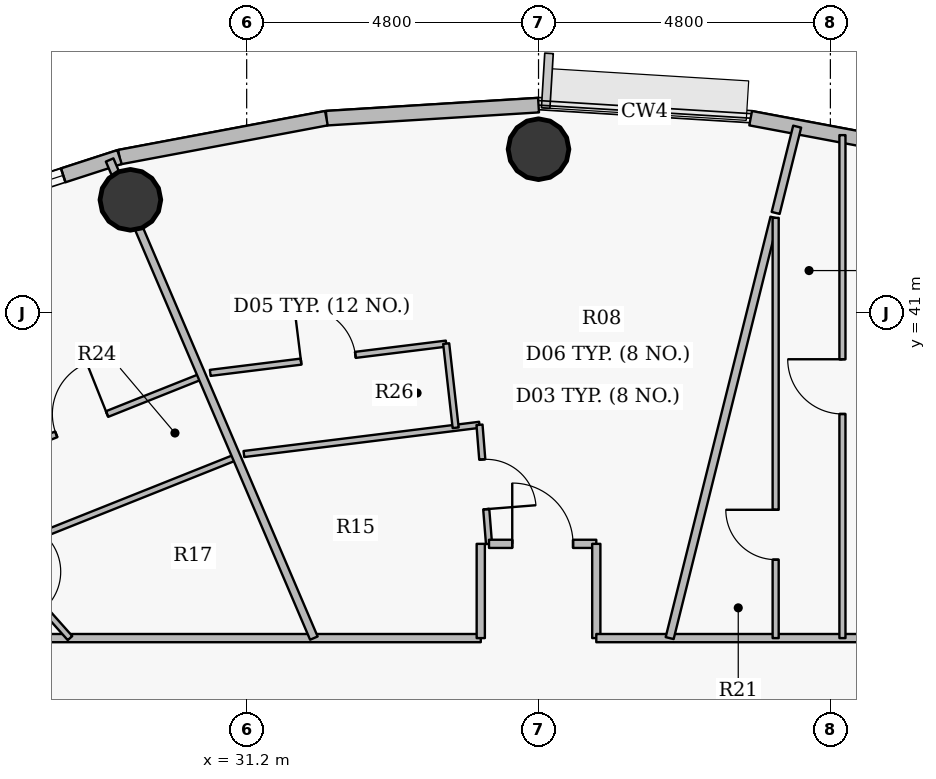
"""IFC4 building model, lengths in metres.
Left out: names, types, materials, properties, quantities, classifications, styles, units other than length and angle.
Written with IfcOpenShell. Run it as: python <this file> out.ifc"""

import sys

from ifc_helpers import new_model, si_unit, direction, frame, frame_2d, origin, origin_2d, place, context, subcontext, project, spatial, rectangle, hollow_circle, extrude, source, transform, mapped, element, fill, save


model = new_model("IFC4")
c1 = context("Model", 3, precision=1e-05, world=origin(), true_north=direction((0.0, 1.0)))
c2 = subcontext(c1, "Body", "Model", "MODEL_VIEW")
j1 = project(units=[si_unit("LENGTHUNIT", "METRE"), si_unit("PLANEANGLEUNIT", "RADIAN")], contexts=[c1])
p1 = place(None, origin())
s1 = spatial("IfcSite", under=j1, at=p1, CompositionType="ELEMENT")
p2 = place(p1, origin())
s2 = spatial("IfcBuilding", under=s1, at=p2, CompositionType="ELEMENT")
p3 = place(p2, frame((0.0, 0.0, 295.5)))
s3 = spatial("IfcBuildingStorey", under=s2, at=p3, CompositionType="ELEMENT", Elevation=295.5)
for number, where, z_axis, x_axis in (
    (1, (36.0, 43.69, 0.0), (0.0, 0.0, 1.0), (1.0, 0.0, 0.0)),
    (2, (29.288, 42.858, 0.0), (0.0, 0.0, 1.0), (1.0, 0.0, 0.0)),
):
    element("IfcColumn", number, at=place(p3, frame(where, z_axis=z_axis, x_axis=x_axis)), inside=s3, PredefinedType="COLUMN", context=c2, shape_type="SweptSolid", body=[
        extrude(hollow_circle(Radius=0.5, WallThickness=0.032, at=origin_2d()), origin(), (0.0, 0.0, 1.0), 3.75),
    ])
p4 = place(p3, frame((39.489, 44.2, 0.0), z_axis=(0.0, 0.0, 1.0), x_axis=(0.982782655757, -0.184765395959, 0.0)))
e3 = element("IfcWall", 3, at=p4, inside=s3, PredefinedType="SOLIDWALL", context=c2, shape_type="SweptSolid", body=[
    extrude(rectangle(XDim=3.462, YDim=0.24, at=frame_2d((1.731, 0.0))), origin(), (0.0, 0.0, 1.0), 3.5),
])
p5 = place(p3, frame((32.511, 44.2, 0.0), z_axis=(0.0, 0.0, 1.0), x_axis=(0.998104946479, 0.061534671648, 0.0)))
e4 = element("IfcWall", 4, at=p5, inside=s3, PredefinedType="SOLIDWALL", context=c2, shape_type="SweptSolid", body=[
    extrude(rectangle(XDim=3.495, YDim=0.24, at=frame_2d((1.748, 0.0))), origin(), (0.0, 0.0, 1.0), 3.5),
])
p6 = place(p3, frame((29.109, 43.56, 0.0), z_axis=(0.0, 0.0, 1.0), x_axis=(0.982782655757, 0.184765395959, 0.0)))
e5 = element("IfcWall", 5, at=p6, inside=s3, PredefinedType="SOLIDWALL", context=c2, shape_type="SweptSolid", body=[
    extrude(rectangle(XDim=3.462, YDim=0.24, at=frame_2d((1.731, 0.0))), origin(), (0.0, 0.0, 1.0), 3.5),
])
p7 = place(p3, frame((25.877, 42.512, 0.0), z_axis=(0.0, 0.0, 1.0), x_axis=(0.95123136723, 0.308478339592, 0.0)))
e6 = element("IfcWall", 6, at=p7, inside=s3, PredefinedType="SOLIDWALL", context=c2, shape_type="SweptSolid", body=[
    extrude(rectangle(XDim=3.398, YDim=0.24, at=frame_2d((1.699, 0.0))), origin(), (0.0, 0.0, 1.0), 3.5),
])
p8 = place(p7, frame((0.824, 0.0, 0.9)))
e7 = element("IfcOpeningElement", 7, at=p8, cuts=e6, PredefinedType="OPENING", context=c2, shape_type="SweptSolid", body=[
    extrude(rectangle(XDim=1.6, YDim=1.75, at=origin_2d()), frame((0.8, 0.13, 0.875), z_axis=(0.0, -1.0, 0.0), x_axis=(1.0, 0.0, 0.0)), (0.0, 0.0, 1.0), 0.26),
])
p9 = place(p3, frame((24.95, 35.65, 0.0), z_axis=(0.0, 0.0, 1.0), x_axis=(1.0, 0.0, 0.0)))
e8 = element("IfcWall", 8, at=p9, inside=s3, PredefinedType="PARTITIONING", context=c2, shape_type="SweptSolid", body=[
    extrude(rectangle(XDim=10.1, YDim=0.135, at=frame_2d((5.05, 0.0))), origin(), (0.0, 0.0, 1.0), 3.035),
])
p10 = place(p9, frame((1.192, 0.0, 0.0)))
e9 = element("IfcOpeningElement", 9, at=p10, cuts=e8, PredefinedType="OPENING", context=c2, shape_type="SweptSolid", body=[
    extrude(rectangle(XDim=1.0, YDim=2.15, at=origin_2d()), frame((0.5, 0.078, 1.075), z_axis=(0.0, -1.0, 0.0), x_axis=(1.0, 0.0, 0.0)), (0.0, 0.0, 1.0), 0.155),
])
p11 = place(p3, frame((26.507, 38.378, 0.0), z_axis=(0.0, 0.0, 1.0), x_axis=(0.928788495711, 0.370610213345, 0.0)))
e10 = element("IfcWall", 10, at=p11, inside=s3, PredefinedType="PARTITIONING", context=c2, shape_type="SweptSolid", body=[
    extrude(rectangle(XDim=4.261, YDim=0.1, at=frame_2d((2.131, 0.0))), origin(), (0.0, 0.0, 1.0), 3.035),
])
p12 = place(p11, frame((1.681, 0.0, 0.0)))
e11 = element("IfcOpeningElement", 11, at=p12, cuts=e10, PredefinedType="OPENING", context=c2, shape_type="SweptSolid", body=[
    extrude(rectangle(XDim=0.9, YDim=2.1, at=origin_2d()), frame((0.45, 0.06, 1.05), z_axis=(0.0, -1.0, 0.0), x_axis=(1.0, 0.0, 0.0)), (0.0, 0.0, 1.0), 0.12),
])
p13 = place(p3, frame((27.055, 37.042, 0.0), z_axis=(0.0, 0.0, 1.0), x_axis=(0.665119722178, -0.746736737525, 0.0)))
e12 = element("IfcWall", 12, at=p13, inside=s3, PredefinedType="PARTITIONING", context=c2, shape_type="SweptSolid", body=[
    extrude(rectangle(XDim=1.864, YDim=0.1, at=frame_2d((0.932, 0.0))), origin(), (0.0, 0.0, 1.0), 3.5),
])
p14 = place(p13, frame((0.401, 0.0, 0.0)))
e13 = element("IfcOpeningElement", 13, at=p14, cuts=e12, PredefinedType="OPENING", context=c2, shape_type="SweptSolid", body=[
    extrude(rectangle(XDim=0.82, YDim=2.1, at=origin_2d()), frame((0.41, 0.06, 1.05), z_axis=(0.0, -1.0, 0.0), x_axis=(1.0, 0.0, 0.0)), (0.0, 0.0, 1.0), 0.12),
])
p15 = place(p3, frame((27.055, 37.042, 0.0), z_axis=(0.0, 0.0, 1.0), x_axis=(0.928814416372, 0.370545246819, 0.0)))
e14 = element("IfcWall", 14, at=p15, inside=s3, PredefinedType="PARTITIONING", context=c2, shape_type="SweptSolid", body=[
    extrude(rectangle(XDim=4.283, YDim=0.1, at=frame_2d((2.141, 0.0))), origin(), (0.0, 0.0, 1.0), 3.035),
])
p16 = place(p3, frame((28.946, 43.513, 0.0), z_axis=(0.0, 0.0, 1.0), x_axis=(0.392833513872, -0.919609607594, 0.0)))
e15 = element("IfcWall", 15, at=p16, inside=s3, PredefinedType="PARTITIONING", context=c2, shape_type="SweptSolid", body=[
    extrude(rectangle(XDim=8.55, YDim=0.135, at=frame_2d((4.275, 0.0))), origin(), (0.0, 0.0, 1.0), 3.035),
])
p17 = place(p3, frame((30.601, 40.011, 0.0), z_axis=(0.0, 0.0, 1.0), x_axis=(0.992391758007, 0.123120260886, 0.0)))
e16 = element("IfcWall", 16, at=p17, inside=s3, PredefinedType="PARTITIONING", context=c2, shape_type="SweptSolid", body=[
    extrude(rectangle(XDim=3.91, YDim=0.1, at=frame_2d((1.955, 0.0))), origin(), (0.0, 0.0, 1.0), 3.035),
])
p18 = place(p17, frame((1.505, 0.0, 0.0)))
e17 = element("IfcOpeningElement", 17, at=p18, cuts=e16, PredefinedType="OPENING", context=c2, shape_type="SweptSolid", body=[
    extrude(rectangle(XDim=0.9, YDim=2.1, at=origin_2d()), frame((0.45, 0.06, 1.05), z_axis=(0.0, -1.0, 0.0), x_axis=(1.0, 0.0, 0.0)), (0.0, 0.0, 1.0), 0.12),
])
p19 = place(p3, frame((31.155, 38.677, 0.0), z_axis=(0.0, 0.0, 1.0), x_axis=(0.992398620659, 0.123064932921, 0.0)))
e18 = element("IfcWall", 18, at=p19, inside=s3, PredefinedType="PARTITIONING", context=c2, shape_type="SweptSolid", body=[
    extrude(rectangle(XDim=3.904, YDim=0.1, at=frame_2d((1.952, 0.0))), origin(), (0.0, 0.0, 1.0), 3.035),
])
p20 = place(p3, frame((34.481, 40.493, 0.0), z_axis=(0.0, 0.0, 1.0), x_axis=(0.111835884353, -0.993726690278, 0.0)))
e19 = element("IfcWall", 19, at=p20, inside=s3, PredefinedType="PARTITIONING", context=c2, shape_type="SweptSolid", body=[
    extrude(rectangle(XDim=1.393, YDim=0.1, at=frame_2d((0.696, 0.0))), origin(), (0.0, 0.0, 1.0), 3.035),
])
p21 = place(p3, frame((35.029, 39.158, 0.0), z_axis=(0.0, 0.0, 1.0), x_axis=(0.079557473452, -0.996830280649, 0.0)))
e20 = element("IfcWall", 20, at=p21, inside=s3, PredefinedType="PARTITIONING", context=c2, shape_type="SweptSolid", body=[
    extrude(rectangle(XDim=1.964, YDim=0.1, at=frame_2d((0.982, 0.0))), origin(), (0.0, 0.0, 1.0), 3.5),
])
p22 = place(p21, frame((0.572, 0.0, 0.0)))
e21 = element("IfcOpeningElement", 21, at=p22, cuts=e20, PredefinedType="OPENING", context=c2, shape_type="SweptSolid", body=[
    extrude(rectangle(XDim=0.82, YDim=2.1, at=origin_2d()), frame((0.41, 0.06, 1.05), z_axis=(0.0, -1.0, 0.0), x_axis=(1.0, 0.0, 0.0)), (0.0, 0.0, 1.0), 0.12),
])
p23 = place(p3, frame((35.05, 35.65, 0.0), z_axis=(0.0, 0.0, 1.0), x_axis=(0.0, 1.0, 0.0)))
e22 = element("IfcWall", 22, at=p23, inside=s3, PredefinedType="PARTITIONING", context=c2, shape_type="SweptSolid", body=[
    extrude(rectangle(XDim=1.55, YDim=0.135, at=frame_2d((0.775, 0.0))), origin(), (0.0, 0.0, 1.0), 3.5),
])
p24 = place(p3, frame((35.186, 37.2, 0.0), z_axis=(0.0, 0.0, 1.0), x_axis=(1.0, 0.0, 0.0)))
e23 = element("IfcWall", 23, at=p24, inside=s3, PredefinedType="PARTITIONING", context=c2, shape_type="SweptSolid", body=[
    extrude(rectangle(XDim=1.764, YDim=0.135, at=frame_2d((0.882, 0.0))), origin(), (0.0, 0.0, 1.0), 3.035),
])
p25 = place(p24, frame((0.382, 0.0, 0.0)))
e24 = element("IfcOpeningElement", 24, at=p25, cuts=e23, PredefinedType="OPENING", context=c2, shape_type="SweptSolid", body=[
    extrude(rectangle(XDim=1.0, YDim=2.15, at=origin_2d()), frame((0.5, 0.078, 1.075), z_axis=(0.0, -1.0, 0.0), x_axis=(1.0, 0.0, 0.0)), (0.0, 0.0, 1.0), 0.155),
])
p26 = place(p3, frame((36.95, 35.65, 0.0), z_axis=(0.0, 0.0, 1.0), x_axis=(0.0, 1.0, 0.0)))
e25 = element("IfcWall", 25, at=p26, inside=s3, PredefinedType="PARTITIONING", context=c2, shape_type="SweptSolid", body=[
    extrude(rectangle(XDim=1.55, YDim=0.135, at=frame_2d((0.775, 0.0))), origin(), (0.0, 0.0, 1.0), 3.5),
])
p27 = place(p3, frame((36.95, 35.65, 0.0), z_axis=(0.0, 0.0, 1.0), x_axis=(1.0, 0.0, 0.0)))
e26 = element("IfcWall", 26, at=p27, inside=s3, PredefinedType="PARTITIONING", context=c2, shape_type="SweptSolid", body=[
    extrude(rectangle(XDim=10.1, YDim=0.135, at=frame_2d((5.05, 0.0))), origin(), (0.0, 0.0, 1.0), 3.035),
])
p28 = place(p27, frame((6.477, 0.0, 0.0)))
e27 = element("IfcOpeningElement", 27, at=p28, cuts=e26, PredefinedType="OPENING", context=c2, shape_type="SweptSolid", body=[
    extrude(rectangle(XDim=1.0, YDim=2.15, at=origin_2d()), frame((0.5, 0.078, 1.075), z_axis=(0.0, -1.0, 0.0), x_axis=(1.0, 0.0, 0.0)), (0.0, 0.0, 1.0), 0.155),
])
p29 = place(p3, frame((38.157, 35.65, 0.0), z_axis=(0.0, 0.0, 1.0), x_axis=(0.241898679066, 0.970301514513, 0.0)))
e28 = element("IfcWall", 28, at=p29, inside=s3, PredefinedType="PARTITIONING", context=c2, shape_type="SweptSolid", body=[
    extrude(rectangle(XDim=7.125, YDim=0.135, at=frame_2d((3.563, 0.0))), origin(), (0.0, 0.0, 1.0), 3.5),
])
p30 = place(p3, frame((39.9, 35.65, 0.0), z_axis=(0.0, 0.0, 1.0), x_axis=(0.0, 1.0, 0.0)))
e29 = element("IfcWall", 29, at=p30, inside=s3, PredefinedType="PARTITIONING", context=c2, shape_type="SweptSolid", body=[
    extrude(rectangle(XDim=6.911, YDim=0.1, at=frame_2d((3.456, 0.0))), origin(), (0.0, 0.0, 1.0), 3.5),
])
p31 = place(p30, frame((1.29, 0.0, 0.0)))
e30 = element("IfcOpeningElement", 30, at=p31, cuts=e29, PredefinedType="OPENING", context=c2, shape_type="SweptSolid", body=[
    extrude(rectangle(XDim=0.82, YDim=2.1, at=origin_2d()), frame((0.41, 0.06, 1.05), z_axis=(0.0, -1.0, 0.0), x_axis=(1.0, 0.0, 0.0)), (0.0, 0.0, 1.0), 0.12),
])
p32 = place(p3, frame((39.9, 42.642, 0.0), z_axis=(0.0, 0.0, 1.0), x_axis=(0.241985841386, 0.970279780563, 0.0)))
e31 = element("IfcWall", 31, at=p32, inside=s3, PredefinedType="PARTITIONING", context=c2, shape_type="SweptSolid", body=[
    extrude(rectangle(XDim=1.463, YDim=0.135, at=frame_2d((0.731, 0.0))), origin(), (0.0, 0.0, 1.0), 2.985),
])
p33 = place(p3, frame((40.998, 35.65, 0.0), z_axis=(0.0, 0.0, 1.0), x_axis=(0.0, 1.0, 0.0)))
e32 = element("IfcWall", 32, at=p33, inside=s3, PredefinedType="PARTITIONING", context=c2, shape_type="SweptSolid", body=[
    extrude(rectangle(XDim=8.271, YDim=0.1, at=frame_2d((4.136, 0.0))), origin(), (0.0, 0.0, 1.0), 2.985),
])
p34 = place(p33, frame((3.686, 0.0, 0.0)))
e33 = element("IfcOpeningElement", 33, at=p34, cuts=e32, PredefinedType="OPENING", context=c2, shape_type="SweptSolid", body=[
    extrude(rectangle(XDim=0.9, YDim=2.1, at=origin_2d()), frame((0.45, 0.06, 1.05), z_axis=(0.0, -1.0, 0.0), x_axis=(1.0, 0.0, 0.0)), (0.0, 0.0, 1.0), 0.12),
])
m1 = source(origin(), c2, "Body", "SweptSolid", [
    extrude(rectangle(XDim=1.6, YDim=1.75, at=origin_2d()), frame((0.8, 0.03, 0.875), z_axis=(0.0, -1.0, 0.0), x_axis=(1.0, 0.0, 0.0)), (0.0, 0.0, 1.0), 0.06),
])
p35 = place(p8, origin())
e34 = element("IfcWindow", 34, at=p35, inside=s3, PartitioningType="DOUBLE_PANEL_VERTICAL", PredefinedType="WINDOW", context=c2, shape_type="MappedRepresentation", body=[
    mapped(m1, transform((0.0, 0.0, 0.0), x_axis=(1.0, 0.0, 0.0), y_axis=(0.0, 1.0, 0.0), z_axis=(0.0, 0.0, 1.0), scale=1.0)),
])
fill(e7, e34)
m2 = source(origin(), c2, "Body", "SweptSolid", [
    extrude(rectangle(XDim=1.0, YDim=2.15, at=origin_2d()), frame((0.5, 0.025, 1.075), z_axis=(0.0, -1.0, 0.0), x_axis=(1.0, 0.0, 0.0)), (0.0, 0.0, 1.0), 0.05),
])
p36 = place(p25, origin())
e35 = element("IfcDoor", 35, at=p36, inside=s3, OperationType="SINGLE_SWING_LEFT", PredefinedType="DOOR", context=c2, shape_type="MappedRepresentation", body=[
    mapped(m2, transform((0.0, 0.0, 0.0), x_axis=(1.0, 0.0, 0.0), y_axis=(0.0, 1.0, 0.0), z_axis=(0.0, 0.0, 1.0), scale=1.0)),
])
fill(e24, e35)
m3 = source(origin(), c2, "Body", "SweptSolid", [
    extrude(rectangle(XDim=0.82, YDim=2.1, at=origin_2d()), frame((0.41, 0.025, 1.05), z_axis=(0.0, -1.0, 0.0), x_axis=(1.0, 0.0, 0.0)), (0.0, 0.0, 1.0), 0.05),
])
p37 = place(p22, origin())
e36 = element("IfcDoor", 36, at=p37, inside=s3, OperationType="SINGLE_SWING_RIGHT", PredefinedType="DOOR", context=c2, shape_type="MappedRepresentation", body=[
    mapped(m3, transform((0.0, 0.0, 0.0), x_axis=(1.0, 0.0, 0.0), y_axis=(0.0, 1.0, 0.0), z_axis=(0.0, 0.0, 1.0), scale=1.0)),
])
fill(e21, e36)
m4 = source(origin(), c2, "Body", "SweptSolid", [
    extrude(rectangle(XDim=0.9, YDim=2.1, at=origin_2d()), frame((0.45, 0.025, 1.05), z_axis=(0.0, -1.0, 0.0), x_axis=(1.0, 0.0, 0.0)), (0.0, 0.0, 1.0), 0.05),
])
p38 = place(p18, origin())
e37 = element("IfcDoor", 37, at=p38, inside=s3, OperationType="SINGLE_SWING_LEFT", PredefinedType="DOOR", context=c2, shape_type="MappedRepresentation", body=[
    mapped(m4, transform((0.0, 0.0, 0.0), x_axis=(1.0, 0.0, 0.0), y_axis=(0.0, 1.0, 0.0), z_axis=(0.0, 0.0, 1.0), scale=1.0)),
])
fill(e17, e37)
p39 = place(p12, origin())
e38 = element("IfcDoor", 38, at=p39, inside=s3, OperationType="SINGLE_SWING_RIGHT", PredefinedType="DOOR", context=c2, shape_type="MappedRepresentation", body=[
    mapped(m4, transform((0.0, 0.0, 0.0), x_axis=(1.0, 0.0, 0.0), y_axis=(0.0, 1.0, 0.0), z_axis=(0.0, 0.0, 1.0), scale=1.0)),
])
fill(e11, e38)
p40 = place(p34, origin())
e39 = element("IfcDoor", 39, at=p40, inside=s3, OperationType="SINGLE_SWING_RIGHT", PredefinedType="DOOR", context=c2, shape_type="MappedRepresentation", body=[
    mapped(m4, transform((0.0, 0.0, 0.0), x_axis=(1.0, 0.0, 0.0), y_axis=(0.0, 1.0, 0.0), z_axis=(0.0, 0.0, 1.0), scale=1.0)),
])
fill(e33, e39)
p41 = place(p31, origin())
e40 = element("IfcDoor", 40, at=p41, inside=s3, OperationType="SINGLE_SWING_RIGHT", PredefinedType="DOOR", context=c2, shape_type="MappedRepresentation", body=[
    mapped(m3, transform((0.0, 0.0, 0.0), x_axis=(1.0, 0.0, 0.0), y_axis=(0.0, 1.0, 0.0), z_axis=(0.0, 0.0, 1.0), scale=1.0)),
])
fill(e30, e40)
save(model, sys.argv[1])
